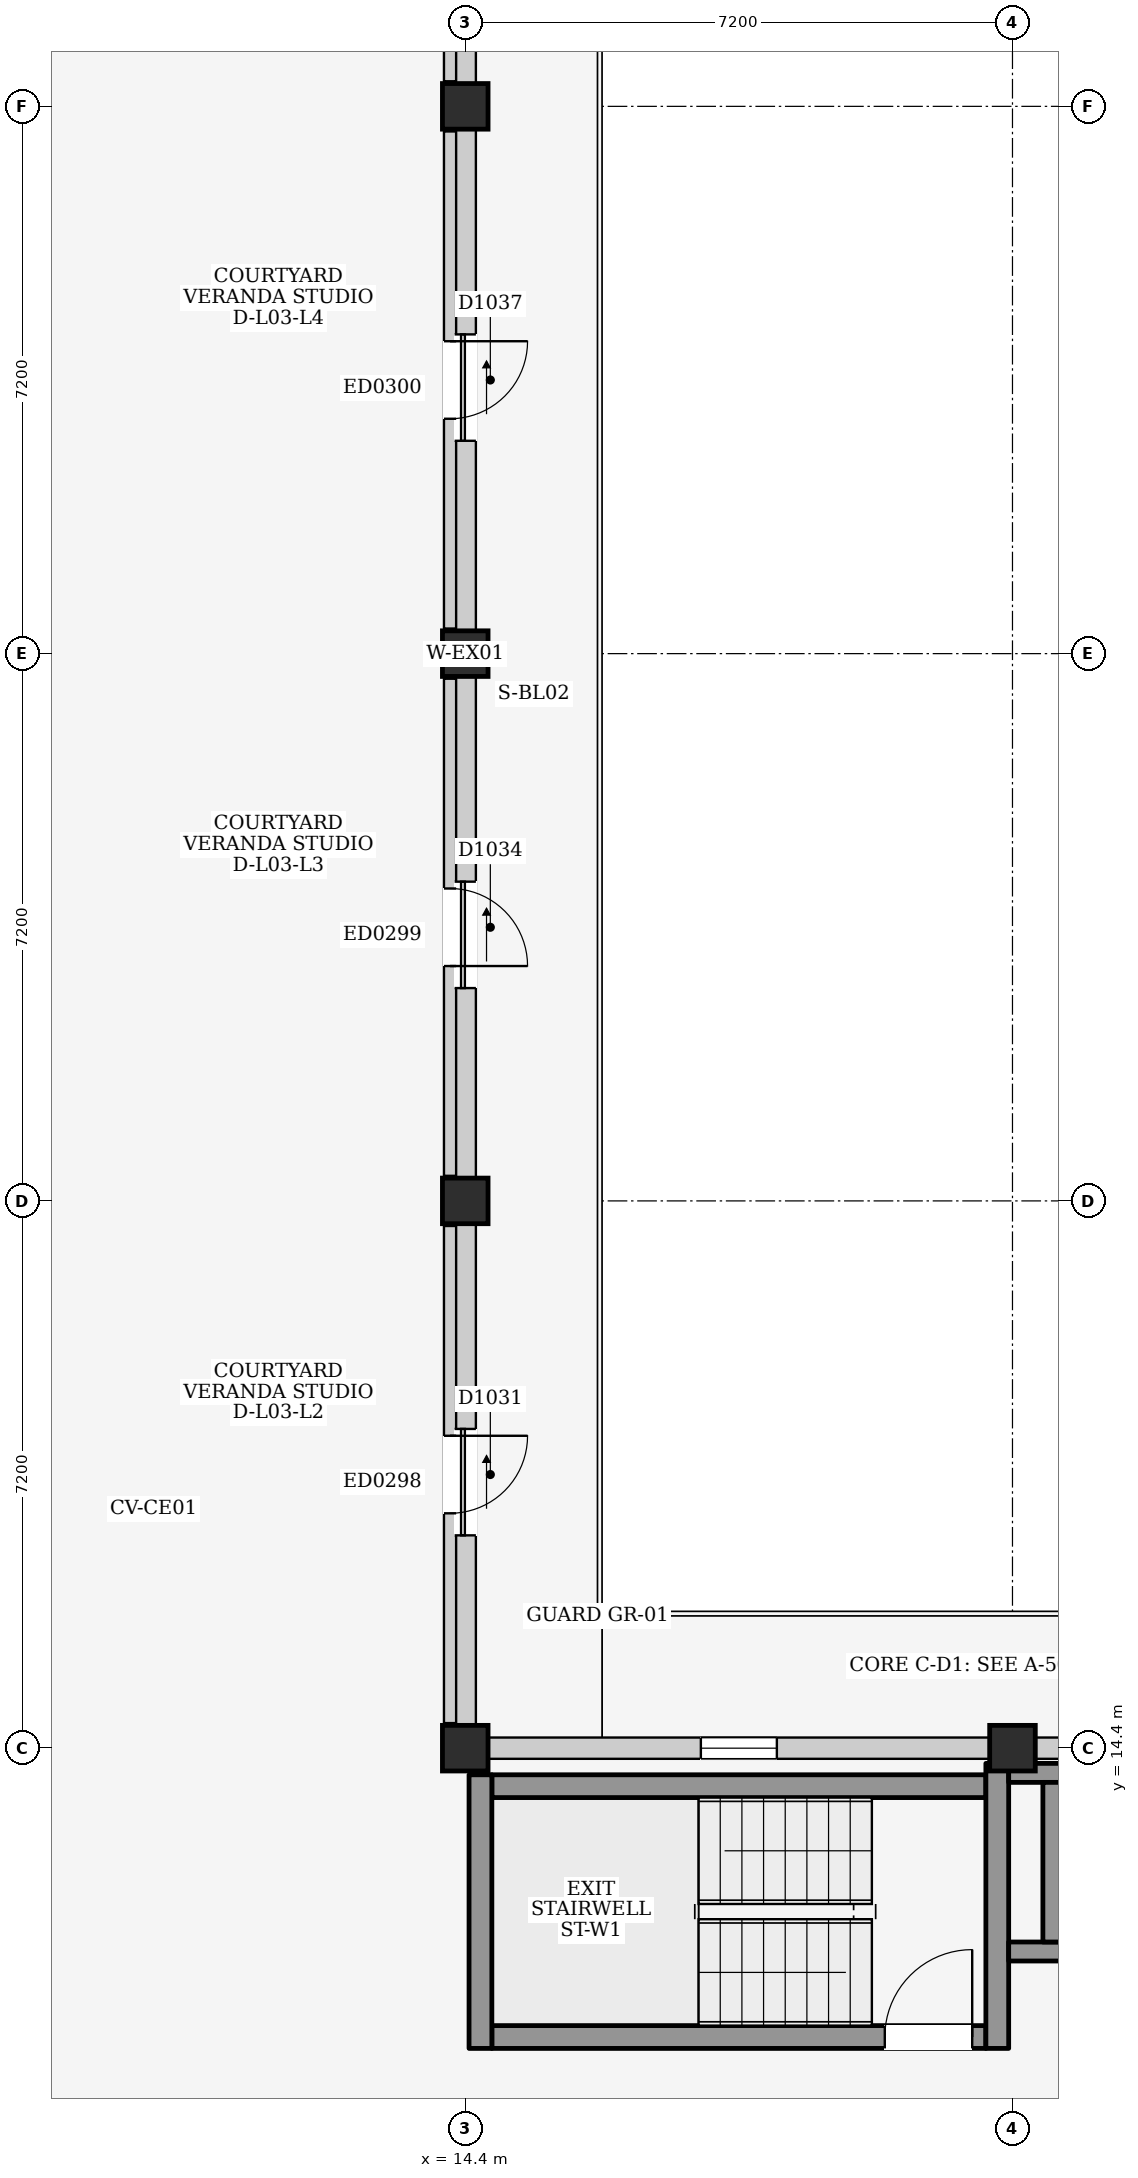
"""IFC4 building model, lengths in metres.
Left out: names, types, materials, properties, quantities, classifications, styles, units other than length and angle.
Written with IfcOpenShell. Run it as: python <this file> out.ifc"""

import sys

from ifc_helpers import new_model, si_unit, direction, frame, frame_2d, origin, origin_2d, place, context, subcontext, project, spatial, rectangle, extrude, element, fill, save


model = new_model("IFC4")
c1 = context("Model", 3, precision=1e-05, world=origin(), true_north=direction((0.0, 1.0)))
c2 = subcontext(c1, "Body", "Model", "MODEL_VIEW")
j1 = project(units=[si_unit("LENGTHUNIT", "METRE"), si_unit("PLANEANGLEUNIT", "RADIAN")], contexts=[c1])
p1 = place(None, origin())
s1 = spatial("IfcSite", under=j1, at=p1, CompositionType="ELEMENT")
p2 = place(p1, origin())
s2 = spatial("IfcBuilding", under=s1, at=p2, CompositionType="ELEMENT")
p3 = place(p2, frame((0.0, 0.0, 12.2)))
s3 = spatial("IfcBuildingStorey", under=s2, at=p3, CompositionType="ELEMENT", Elevation=12.2)
for number, where, z_axis, x_axis in (
    (1, (14.4, 14.4, 0.0), (0.0, 0.0, 1.0), (1.0, 0.0, 0.0)),
    (2, (14.4, 21.6, 0.0), (0.0, 0.0, 1.0), (1.0, 0.0, 0.0)),
    (3, (14.4, 28.8, 0.0), (0.0, 0.0, 1.0), (1.0, 0.0, 0.0)),
    (4, (14.4, 36.0, 0.0), (0.0, 0.0, 1.0), (1.0, 0.0, 0.0)),
    (5, (21.6, 14.4, 0.0), (0.0, 0.0, 1.0), (1.0, 0.0, 0.0)),
):
    element("IfcColumn", number, at=place(p3, frame(where, z_axis=z_axis, x_axis=x_axis)), inside=s3, PredefinedType="COLUMN", context=c2, shape_type="SweptSolid", body=[
        extrude(rectangle(XDim=0.6, YDim=0.6, at=origin_2d()), origin(), (0.0, 0.0, 1.0), 3.2),
    ])
p4 = place(p3, frame((14.4, 14.7, 0.0), z_axis=(0.0, 0.0, 1.0), x_axis=(0.0, 1.0, 0.0)))
e6 = element("IfcWall", 6, at=p4, inside=s3, PredefinedType="ELEMENTEDWALL", context=c2, shape_type="SweptSolid", body=[
    extrude(rectangle(XDim=6.6, YDim=0.28, at=frame_2d((3.3, 0.0))), origin(), (0.0, 0.0, 1.0), 2.415),
])
p5 = place(p4, frame((2.5, 0.0, 0.0)))
e7 = element("IfcOpeningElement", 7, at=p5, cuts=e6, PredefinedType="OPENING", context=c2, shape_type="SweptSolid", body=[
    extrude(rectangle(XDim=1.4, YDim=2.1, at=frame_2d((0.7, 1.05))), frame((0.0, 0.155, 0.0), z_axis=(0.0, -1.0, 0.0), x_axis=(1.0, 0.0, 0.0)), (0.0, 0.0, 1.0), 0.31),
])
p6 = place(p3, frame((14.4, 21.9, 0.0), z_axis=(0.0, 0.0, 1.0), x_axis=(0.0, 1.0, 0.0)))
e8 = element("IfcWall", 8, at=p6, inside=s3, PredefinedType="ELEMENTEDWALL", context=c2, shape_type="SweptSolid", body=[
    extrude(rectangle(XDim=6.6, YDim=0.28, at=frame_2d((3.3, 0.0))), origin(), (0.0, 0.0, 1.0), 2.415),
])
p7 = place(p6, frame((2.5, 0.0, 0.0)))
e9 = element("IfcOpeningElement", 9, at=p7, cuts=e8, PredefinedType="OPENING", context=c2, shape_type="SweptSolid", body=[
    extrude(rectangle(XDim=1.4, YDim=2.1, at=frame_2d((0.7, 1.05))), frame((0.0, 0.155, 0.0), z_axis=(0.0, -1.0, 0.0), x_axis=(1.0, 0.0, 0.0)), (0.0, 0.0, 1.0), 0.31),
])
p8 = place(p3, frame((14.4, 29.1, 0.0), z_axis=(0.0, 0.0, 1.0), x_axis=(0.0, 1.0, 0.0)))
e10 = element("IfcWall", 10, at=p8, inside=s3, PredefinedType="ELEMENTEDWALL", context=c2, shape_type="SweptSolid", body=[
    extrude(rectangle(XDim=6.6, YDim=0.28, at=frame_2d((3.3, 0.0))), origin(), (0.0, 0.0, 1.0), 2.415),
])
p9 = place(p8, frame((2.5, 0.0, 0.0)))
e11 = element("IfcOpeningElement", 11, at=p9, cuts=e10, PredefinedType="OPENING", context=c2, shape_type="SweptSolid", body=[
    extrude(rectangle(XDim=1.4, YDim=2.1, at=frame_2d((0.7, 1.05))), frame((0.0, 0.155, 0.0), z_axis=(0.0, -1.0, 0.0), x_axis=(1.0, 0.0, 0.0)), (0.0, 0.0, 1.0), 0.31),
])
p10 = place(p3, frame((14.4, 36.3, 0.0), z_axis=(0.0, 0.0, 1.0), x_axis=(0.0, 1.0, 0.0)))
e12 = element("IfcWall", 12, at=p10, inside=s3, PredefinedType="ELEMENTEDWALL", context=c2, shape_type="SweptSolid", body=[
    extrude(rectangle(XDim=6.6, YDim=0.28, at=frame_2d((3.3, 0.0))), origin(), (0.0, 0.0, 1.0), 2.415),
])
p11 = place(p10, frame((2.5, 0.0, 0.0)))
e13 = element("IfcOpeningElement", 13, at=p11, cuts=e12, PredefinedType="OPENING", context=c2, shape_type="SweptSolid", body=[
    extrude(rectangle(XDim=1.4, YDim=2.1, at=frame_2d((0.7, 1.05))), frame((0.0, 0.155, 0.0), z_axis=(0.0, -1.0, 0.0), x_axis=(1.0, 0.0, 0.0)), (0.0, 0.0, 1.0), 0.31),
])
p12 = place(p3, frame((14.7, 14.4, 0.0), z_axis=(0.0, 0.0, 1.0), x_axis=(1.0, 0.0, 0.0)))
e14 = element("IfcWall", 14, at=p12, inside=s3, PredefinedType="ELEMENTEDWALL", context=c2, shape_type="SweptSolid", body=[
    extrude(rectangle(XDim=6.6, YDim=0.28, at=frame_2d((3.3, 0.0))), origin(), (0.0, 0.0, 1.0), 2.365),
])
p13 = place(p12, frame((2.8, 0.0, 1.2)))
e15 = element("IfcOpeningElement", 15, at=p13, cuts=e14, PredefinedType="OPENING", context=c2, shape_type="SweptSolid", body=[
    extrude(rectangle(XDim=1.0, YDim=0.9, at=frame_2d((0.5, 0.45))), frame((0.0, 0.155, 0.0), z_axis=(0.0, -1.0, 0.0), x_axis=(1.0, 0.0, 0.0)), (0.0, 0.0, 1.0), 0.31),
])
p14 = place(p3, frame((21.9, 14.4, 0.0), z_axis=(0.0, 0.0, 1.0), x_axis=(1.0, 0.0, 0.0)))
e16 = element("IfcWall", 16, at=p14, inside=s3, PredefinedType="ELEMENTEDWALL", context=c2, shape_type="SweptSolid", body=[
    extrude(rectangle(XDim=6.6, YDim=0.28, at=frame_2d((3.3, 0.0))), origin(), (0.0, 0.0, 1.0), 2.365),
])
p15 = place(p14, frame((2.8, 0.0, 1.2)))
e17 = element("IfcOpeningElement", 17, at=p15, cuts=e16, PredefinedType="OPENING", context=c2, shape_type="SweptSolid", body=[
    extrude(rectangle(XDim=1.0, YDim=0.9, at=frame_2d((0.5, 0.45))), frame((0.0, 0.155, 0.0), z_axis=(0.0, -1.0, 0.0), x_axis=(1.0, 0.0, 0.0)), (0.0, 0.0, 1.0), 0.31),
])
p16 = place(p3, frame((14.75, 10.6, 0.0), z_axis=(0.0, 0.0, 1.0), x_axis=(1.0, 0.0, 0.0)))
e18 = element("IfcWall", 18, at=p16, inside=s3, PredefinedType="SHEAR", context=c2, shape_type="SweptSolid", body=[
    extrude(rectangle(XDim=6.5, YDim=0.3, at=frame_2d((3.25, 0.0))), origin(), (0.0, 0.0, 1.0), 2.98),
])
p17 = place(p16, frame((5.17, 0.0, 0.0)))
e19 = element("IfcOpeningElement", 19, at=p17, cuts=e18, PredefinedType="OPENING", context=c2, shape_type="SweptSolid", body=[
    extrude(rectangle(XDim=1.15, YDim=2.2, at=frame_2d((0.575, 1.1))), frame((0.0, 0.165, 0.0), z_axis=(0.0, -1.0, 0.0), x_axis=(1.0, 0.0, 0.0)), (0.0, 0.0, 1.0), 0.33),
])
p18 = place(p3, frame((14.75, 13.9, 0.0), z_axis=(0.0, 0.0, 1.0), x_axis=(1.0, 0.0, 0.0)))
e20 = element("IfcWall", 20, at=p18, inside=s3, PredefinedType="SHEAR", context=c2, shape_type="SweptSolid", body=[
    extrude(rectangle(XDim=6.5, YDim=0.3, at=frame_2d((3.25, 0.0))), origin(), (0.0, 0.0, 1.0), 2.98),
])
p19 = place(p3, frame((14.6, 10.45, 0.0), z_axis=(0.0, 0.0, 1.0), x_axis=(0.0, 1.0, 0.0)))
e21 = element("IfcWall", 21, at=p19, inside=s3, PredefinedType="SHEAR", context=c2, shape_type="SweptSolid", body=[
    extrude(rectangle(XDim=3.6, YDim=0.3, at=frame_2d((1.8, 0.0))), origin(), (0.0, 0.0, 1.0), 2.98),
])
p20 = place(p3, frame((21.4, 10.45, 0.0), z_axis=(0.0, 0.0, 1.0), x_axis=(0.0, 1.0, 0.0)))
e22 = element("IfcWall", 22, at=p20, inside=s3, PredefinedType="SHEAR", context=c2, shape_type="SweptSolid", body=[
    extrude(rectangle(XDim=3.75, YDim=0.3, at=frame_2d((1.875, 0.0))), origin(), (0.0, 0.0, 1.0), 2.98),
])
p21 = place(p3, frame((21.55, 11.725, 0.0), z_axis=(0.0, 0.0, 1.0), x_axis=(1.0, 0.0, 0.0)))
e23 = element("IfcWall", 23, at=p21, inside=s3, PredefinedType="SHEAR", context=c2, shape_type="SweptSolid", body=[
    extrude(rectangle(XDim=2.55, YDim=0.25, at=frame_2d((1.275, 0.0))), origin(), (0.0, 0.0, 1.0), 2.98),
])
p22 = place(p21, frame((0.95, 0.0, 0.0)))
e24 = element("IfcOpeningElement", 24, at=p22, cuts=e23, PredefinedType="OPENING", context=c2, shape_type="SweptSolid", body=[
    extrude(rectangle(XDim=1.1, YDim=2.15, at=frame_2d((0.55, 1.075))), frame((0.0, 0.14, 0.0), z_axis=(0.0, -1.0, 0.0), x_axis=(1.0, 0.0, 0.0)), (0.0, 0.0, 1.0), 0.28),
])
p23 = place(p3, frame((21.55, 14.075, 0.0), z_axis=(0.0, 0.0, 1.0), x_axis=(1.0, 0.0, 0.0)))
e25 = element("IfcWall", 25, at=p23, inside=s3, PredefinedType="SHEAR", context=c2, shape_type="SweptSolid", body=[
    extrude(rectangle(XDim=2.55, YDim=0.25, at=frame_2d((1.275, 0.0))), origin(), (0.0, 0.0, 1.0), 2.98),
])
p24 = place(p3, frame((22.125, 11.85, 0.0), z_axis=(0.0, 0.0, 1.0), x_axis=(0.0, 1.0, 0.0)))
e26 = element("IfcWall", 26, at=p24, inside=s3, PredefinedType="SHEAR", context=c2, shape_type="SweptSolid", body=[
    extrude(rectangle(XDim=2.1, YDim=0.25, at=frame_2d((1.05, 0.0))), origin(), (0.0, 0.0, 1.0), 2.98),
])
p25 = place(p3, frame((14.2, 14.73, 0.0), z_axis=(0.0, 0.0, 1.0), x_axis=(0.0, 1.0, 0.0)))
e27 = element("IfcWall", 27, at=p25, inside=s3, PredefinedType="PARTITIONING", context=c2, shape_type="SweptSolid", body=[
    extrude(rectangle(XDim=6.54, YDim=0.16, at=frame_2d((3.27, 0.0))), origin(), (0.0, 0.0, 1.0), 2.415),
])
p26 = place(p25, frame((2.76, 0.0, 0.0)))
e28 = element("IfcOpeningElement", 28, at=p26, cuts=e27, PredefinedType="OPENING", context=c2, shape_type="SweptSolid", body=[
    extrude(rectangle(XDim=1.02, YDim=2.18, at=frame_2d((0.51, 1.09))), frame((0.0, 0.095, 0.0), z_axis=(0.0, -1.0, 0.0), x_axis=(1.0, 0.0, 0.0)), (0.0, 0.0, 1.0), 0.19),
])
p27 = place(p3, frame((14.2, 21.93, 0.0), z_axis=(0.0, 0.0, 1.0), x_axis=(0.0, 1.0, 0.0)))
e29 = element("IfcWall", 29, at=p27, inside=s3, PredefinedType="PARTITIONING", context=c2, shape_type="SweptSolid", body=[
    extrude(rectangle(XDim=6.54, YDim=0.16, at=frame_2d((3.27, 0.0))), origin(), (0.0, 0.0, 1.0), 2.415),
])
p28 = place(p27, frame((2.76, 0.0, 0.0)))
e30 = element("IfcOpeningElement", 30, at=p28, cuts=e29, PredefinedType="OPENING", context=c2, shape_type="SweptSolid", body=[
    extrude(rectangle(XDim=1.02, YDim=2.18, at=frame_2d((0.51, 1.09))), frame((0.0, 0.095, 0.0), z_axis=(0.0, -1.0, 0.0), x_axis=(1.0, 0.0, 0.0)), (0.0, 0.0, 1.0), 0.19),
])
p29 = place(p3, frame((14.2, 29.13, 0.0), z_axis=(0.0, 0.0, 1.0), x_axis=(0.0, 1.0, 0.0)))
e31 = element("IfcWall", 31, at=p29, inside=s3, PredefinedType="PARTITIONING", context=c2, shape_type="SweptSolid", body=[
    extrude(rectangle(XDim=6.54, YDim=0.16, at=frame_2d((3.27, 0.0))), origin(), (0.0, 0.0, 1.0), 2.415),
])
p30 = place(p29, frame((2.76, 0.0, 0.0)))
e32 = element("IfcOpeningElement", 32, at=p30, cuts=e31, PredefinedType="OPENING", context=c2, shape_type="SweptSolid", body=[
    extrude(rectangle(XDim=1.02, YDim=2.18, at=frame_2d((0.51, 1.09))), frame((0.0, 0.095, 0.0), z_axis=(0.0, -1.0, 0.0), x_axis=(1.0, 0.0, 0.0)), (0.0, 0.0, 1.0), 0.19),
])
p31 = place(p3, frame((14.2, 36.33, 0.0), z_axis=(0.0, 0.0, 1.0), x_axis=(0.0, 1.0, 0.0)))
e33 = element("IfcWall", 33, at=p31, inside=s3, PredefinedType="PARTITIONING", context=c2, shape_type="SweptSolid", body=[
    extrude(rectangle(XDim=6.54, YDim=0.16, at=frame_2d((3.27, 0.0))), origin(), (0.0, 0.0, 1.0), 2.415),
])
p32 = place(p31, frame((2.76, 0.0, 0.0)))
e34 = element("IfcOpeningElement", 34, at=p32, cuts=e33, PredefinedType="OPENING", context=c2, shape_type="SweptSolid", body=[
    extrude(rectangle(XDim=1.02, YDim=2.18, at=frame_2d((0.51, 1.09))), frame((0.0, 0.095, 0.0), z_axis=(0.0, -1.0, 0.0), x_axis=(1.0, 0.0, 0.0)), (0.0, 0.0, 1.0), 0.19),
])
p33 = place(p5, frame((1.4, 0.0, 0.0), z_axis=(0.0, 0.0, 1.0), x_axis=(-1.0, 0.0, 0.0)))
e35 = element("IfcDoor", 35, at=p33, inside=s3, OperationType="SLIDING_TO_RIGHT", PredefinedType="DOOR", context=c2, shape_type="SweptSolid", body=[
    extrude(rectangle(XDim=1.4, YDim=2.1, at=frame_2d((0.7, 1.05))), frame((0.0, 0.025, 0.0), z_axis=(0.0, -1.0, 0.0), x_axis=(1.0, 0.0, 0.0)), (0.0, 0.0, 1.0), 0.05),
])
fill(e7, e35)
p34 = place(p7, frame((1.4, 0.0, 0.0), z_axis=(0.0, 0.0, 1.0), x_axis=(-1.0, 0.0, 0.0)))
e36 = element("IfcDoor", 36, at=p34, inside=s3, OperationType="SLIDING_TO_RIGHT", PredefinedType="DOOR", context=c2, shape_type="SweptSolid", body=[
    extrude(rectangle(XDim=1.4, YDim=2.1, at=frame_2d((0.7, 1.05))), frame((0.0, 0.025, 0.0), z_axis=(0.0, -1.0, 0.0), x_axis=(1.0, 0.0, 0.0)), (0.0, 0.0, 1.0), 0.05),
])
fill(e9, e36)
p35 = place(p9, frame((1.4, 0.0, 0.0), z_axis=(0.0, 0.0, 1.0), x_axis=(-1.0, 0.0, 0.0)))
e37 = element("IfcDoor", 37, at=p35, inside=s3, OperationType="SLIDING_TO_RIGHT", PredefinedType="DOOR", context=c2, shape_type="SweptSolid", body=[
    extrude(rectangle(XDim=1.4, YDim=2.1, at=frame_2d((0.7, 1.05))), frame((0.0, 0.025, 0.0), z_axis=(0.0, -1.0, 0.0), x_axis=(1.0, 0.0, 0.0)), (0.0, 0.0, 1.0), 0.05),
])
fill(e11, e37)
p36 = place(p13, origin())
e38 = element("IfcWindow", 38, at=p36, inside=s3, PartitioningType="SINGLE_PANEL", PredefinedType="WINDOW", context=c2, shape_type="SweptSolid", body=[
    extrude(rectangle(XDim=1.0, YDim=0.9, at=frame_2d((0.5, 0.45))), frame((0.0, 0.03, 0.0), z_axis=(0.0, -1.0, 0.0), x_axis=(1.0, 0.0, 0.0)), (0.0, 0.0, 1.0), 0.06),
])
fill(e15, e38)
p37 = place(p17, origin())
e39 = element("IfcDoor", 39, at=p37, inside=s3, OperationType="SINGLE_SWING_RIGHT", PredefinedType="DOOR", context=c2, shape_type="SweptSolid", body=[
    extrude(rectangle(XDim=1.15, YDim=2.2, at=frame_2d((0.575, 1.1))), frame((0.0, 0.025, 0.0), z_axis=(0.0, -1.0, 0.0), x_axis=(1.0, 0.0, 0.0)), (0.0, 0.0, 1.0), 0.05),
])
fill(e19, e39)
p38 = place(p26, frame((1.02, 0.0, 0.0), z_axis=(0.0, 0.0, 1.0), x_axis=(-1.0, 0.0, 0.0)))
e40 = element("IfcDoor", 40, at=p38, inside=s3, OperationType="SINGLE_SWING_LEFT", PredefinedType="DOOR", context=c2, shape_type="SweptSolid", body=[
    extrude(rectangle(XDim=1.02, YDim=2.18, at=frame_2d((0.51, 1.09))), frame((0.0, 0.025, 0.0), z_axis=(0.0, -1.0, 0.0), x_axis=(1.0, 0.0, 0.0)), (0.0, 0.0, 1.0), 0.05),
])
fill(e28, e40)
p39 = place(p28, frame((1.02, 0.0, 0.0), z_axis=(0.0, 0.0, 1.0), x_axis=(-1.0, 0.0, 0.0)))
e41 = element("IfcDoor", 41, at=p39, inside=s3, OperationType="SINGLE_SWING_RIGHT", PredefinedType="DOOR", context=c2, shape_type="SweptSolid", body=[
    extrude(rectangle(XDim=1.02, YDim=2.18, at=frame_2d((0.51, 1.09))), frame((0.0, 0.025, 0.0), z_axis=(0.0, -1.0, 0.0), x_axis=(1.0, 0.0, 0.0)), (0.0, 0.0, 1.0), 0.05),
])
fill(e30, e41)
p40 = place(p30, frame((1.02, 0.0, 0.0), z_axis=(0.0, 0.0, 1.0), x_axis=(-1.0, 0.0, 0.0)))
e42 = element("IfcDoor", 42, at=p40, inside=s3, OperationType="SINGLE_SWING_LEFT", PredefinedType="DOOR", context=c2, shape_type="SweptSolid", body=[
    extrude(rectangle(XDim=1.02, YDim=2.18, at=frame_2d((0.51, 1.09))), frame((0.0, 0.025, 0.0), z_axis=(0.0, -1.0, 0.0), x_axis=(1.0, 0.0, 0.0)), (0.0, 0.0, 1.0), 0.05),
])
fill(e32, e42)
save(model, sys.argv[1])
